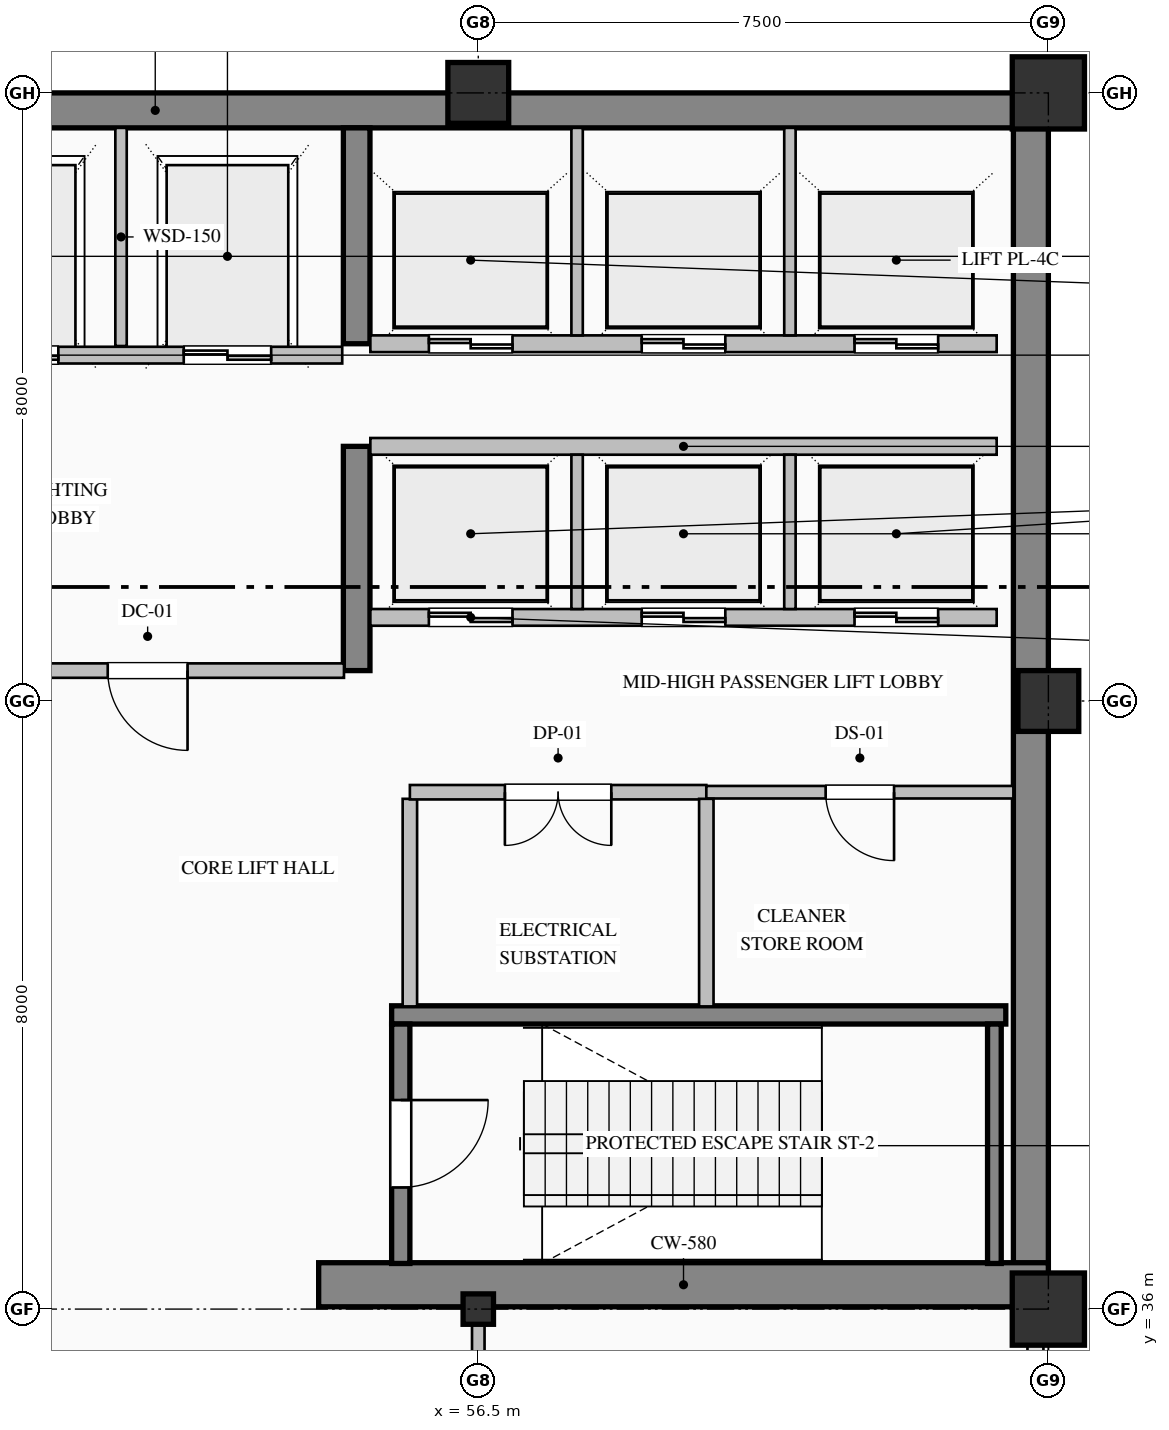
"""IFC4 building model, lengths in metres.
Left out: names, types, materials, properties, quantities, classifications, styles, units other than length and angle.
Written with IfcOpenShell. Run it as: python <this file> out.ifc"""

import sys

from ifc_helpers import new_model, si_unit, direction, frame, frame_2d, origin, origin_2d, place, context, subcontext, project, spatial, rectangle, hollow_rectangle, i_section, extrude, element, fill, save


model = new_model("IFC4")
c1 = context("Model", 3, precision=1e-05, world=origin(), true_north=direction((0.0, 1.0)))
c2 = subcontext(c1, "Body", "Model", "MODEL_VIEW")
j1 = project(units=[si_unit("LENGTHUNIT", "METRE"), si_unit("PLANEANGLEUNIT", "RADIAN")], contexts=[c1])
p1 = place(None, origin())
s1 = spatial("IfcSite", under=j1, at=p1, CompositionType="ELEMENT")
p2 = place(p1, origin())
s2 = spatial("IfcBuilding", under=s1, at=p2, CompositionType="ELEMENT")
p3 = place(p2, frame((0.0, 0.0, 200.4)))
s3 = spatial("IfcBuildingStorey", under=s2, at=p3, CompositionType="ELEMENT", Elevation=200.4)
p4 = place(p3, frame((40.5, 51.77, 0.0), z_axis=(0.0, 0.0, 1.0), x_axis=(1.0, 0.0, 0.0)))
e1 = element("IfcWall", 1, at=p4, inside=s3, PredefinedType="SHEAR", context=c2, shape_type="SweptSolid", body=[
    extrude(rectangle(XDim=23.5, YDim=0.46, at=frame_2d((11.75, 0.0))), origin(), (0.0, 0.0, 1.0), 5.175),
])
p5 = place(p3, frame((63.77, 36.32, 0.0), z_axis=(0.0, 0.0, 1.0), x_axis=(0.0, 1.0, 0.0)))
e2 = element("IfcWall", 2, at=p5, inside=s3, PredefinedType="SHEAR", context=c2, shape_type="SweptSolid", body=[
    extrude(rectangle(XDim=15.22, YDim=0.46, at=frame_2d((7.61, 0.0))), origin(), (0.0, 0.0, 1.0), 5.175),
])
p6 = place(p3, frame((54.4, 36.32, 0.0), z_axis=(0.0, 0.0, 1.0), x_axis=(1.0, 0.0, 0.0)))
e3 = element("IfcWall", 3, at=p6, inside=s3, PredefinedType="SHEAR", context=c2, shape_type="SweptSolid", body=[
    extrude(rectangle(XDim=9.6, YDim=0.58, at=frame_2d((4.8, 0.0))), origin(), (0.0, 0.0, 1.0), 5.4),
])
p7 = place(p3, frame((54.9, 44.4, 0.0), z_axis=(0.0, 0.0, 1.0), x_axis=(0.0, 1.0, 0.0)))
e4 = element("IfcWall", 4, at=p7, inside=s3, PredefinedType="SHEAR", context=c2, shape_type="SweptSolid", body=[
    extrude(rectangle(XDim=2.95, YDim=0.35, at=frame_2d((1.475, 0.0))), origin(), (0.0, 0.0, 1.0), 5.175),
])
p8 = place(p3, frame((54.9, 48.7, 0.0), z_axis=(0.0, 0.0, 1.0), x_axis=(0.0, 1.0, 0.0)))
e5 = element("IfcWall", 5, at=p8, inside=s3, PredefinedType="SHEAR", context=c2, shape_type="SweptSolid", body=[
    extrude(rectangle(XDim=2.84, YDim=0.35, at=frame_2d((1.42, 0.0))), origin(), (0.0, 0.0, 1.0), 5.175),
])
p9 = place(p3, frame((56.5, 36.0, 0.0), z_axis=(0.0, 0.0, 1.0), x_axis=(1.0, 0.0, 0.0)))
e6 = element("IfcColumn", 6, at=p9, inside=s3, PredefinedType="COLUMN", context=c2, shape_type="SweptSolid", body=[
    extrude(i_section(OverallWidth=0.4, OverallDepth=0.4, WebThickness=0.013, FlangeThickness=0.021, FilletRadius=0.022, at=origin_2d()), origin(), (0.0, 0.0, 1.0), 5.4),
])
p10 = place(p3, frame((56.5, 52.0, 0.0), z_axis=(0.0, 0.0, 1.0), x_axis=(1.0, 0.0, 0.0)))
e7 = element("IfcColumn", 7, at=p10, inside=s3, PredefinedType="COLUMN", context=c2, shape_type="SweptSolid", body=[
    extrude(hollow_rectangle(XDim=0.8, YDim=0.8, WallThickness=0.032, at=origin_2d()), origin(), (0.0, 0.0, 1.0), 5.4),
])
p11 = place(p3, frame((64.0, 36.0, 0.0), z_axis=(0.0, 0.0, 1.0), x_axis=(1.0, 0.0, 0.0)))
e8 = element("IfcColumn", 8, at=p11, inside=s3, PredefinedType="COLUMN", context=c2, shape_type="SweptSolid", body=[
    extrude(hollow_rectangle(XDim=0.95, YDim=0.95, WallThickness=0.036, at=origin_2d()), origin(), (0.0, 0.0, 1.0), 5.4),
])
p12 = place(p3, frame((64.0, 44.0, 0.0), z_axis=(0.0, 0.0, 1.0), x_axis=(1.0, 0.0, 0.0)))
e9 = element("IfcColumn", 9, at=p12, inside=s3, PredefinedType="COLUMN", context=c2, shape_type="SweptSolid", body=[
    extrude(hollow_rectangle(XDim=0.8, YDim=0.8, WallThickness=0.032, at=origin_2d()), origin(), (0.0, 0.0, 1.0), 5.4),
])
p13 = place(p3, frame((64.0, 52.0, 0.0), z_axis=(0.0, 0.0, 1.0), x_axis=(1.0, 0.0, 0.0)))
e10 = element("IfcColumn", 10, at=p13, inside=s3, PredefinedType="COLUMN", context=c2, shape_type="SweptSolid", body=[
    extrude(hollow_rectangle(XDim=0.95, YDim=0.95, WallThickness=0.036, at=origin_2d()), origin(), (0.0, 0.0, 1.0), 5.4),
])
p14 = place(p3, frame((55.36, 39.87, 0.0), z_axis=(0.0, 0.0, 1.0), x_axis=(1.0, 0.0, 0.0)))
e11 = element("IfcWall", 11, at=p14, inside=s3, PredefinedType="SOLIDWALL", context=c2, shape_type="SweptSolid", body=[
    extrude(rectangle(XDim=8.08, YDim=0.24, at=frame_2d((4.04, 0.0))), origin(), (0.0, 0.0, 1.0), 5.4),
])
p15 = place(p3, frame((55.48, 39.75, 0.0), z_axis=(0.0, 0.0, 1.0), x_axis=(0.0, -1.0, 0.0)))
e12 = element("IfcWall", 12, at=p15, inside=s3, PredefinedType="SOLIDWALL", context=c2, shape_type="SweptSolid", body=[
    extrude(rectangle(XDim=3.15, YDim=0.24, at=frame_2d((1.575, 0.0))), origin(), (0.0, 0.0, 1.0), 5.4),
])
p16 = place(p15, frame((1.0, 0.0, 0.0)))
e13 = element("IfcOpeningElement", 13, at=p16, cuts=e12, PredefinedType="OPENING", context=c2, shape_type="SweptSolid", body=[
    extrude(rectangle(XDim=1.15, YDim=2.2, at=frame_2d((0.575, 1.1))), frame((0.0, 0.13, 0.0), z_axis=(0.0, -1.0, 0.0), x_axis=(1.0, 0.0, 0.0)), (0.0, 0.0, 1.0), 0.26),
])
p17 = place(p3, frame((63.29, 36.6, 0.0), z_axis=(0.0, 0.0, 1.0), x_axis=(0.0, 1.0, 0.0)))
e14 = element("IfcWall", 14, at=p17, inside=s3, PredefinedType="SOLIDWALL", context=c2, shape_type="SweptSolid", body=[
    extrude(rectangle(XDim=3.15, YDim=0.18, at=frame_2d((1.575, 0.0))), origin(), (0.0, 0.0, 1.0), 5.4),
])
p18 = place(p3, frame((54.71, 48.55, 0.0), z_axis=(0.0, 0.0, 1.0), x_axis=(-1.0, 0.0, 0.0)))
e15 = element("IfcWall", 15, at=p18, inside=s3, PredefinedType="PARTITIONING", context=c2, shape_type="SweptSolid", body=[
    extrude(rectangle(XDim=5.12, YDim=0.22, at=frame_2d((2.56, 0.0))), origin(), (0.0, 0.0, 1.0), 5.175),
])
p19 = place(p18, frame((3.735, 0.0, 0.0)))
e16 = element("IfcOpeningElement", 16, at=p19, cuts=e15, PredefinedType="OPENING", context=c2, shape_type="SweptSolid", body=[
    extrude(rectangle(XDim=1.15, YDim=2.2, at=frame_2d((0.575, 1.1))), frame((0.0, 0.12, 0.0), z_axis=(0.0, -1.0, 0.0), x_axis=(1.0, 0.0, 0.0)), (0.0, 0.0, 1.0), 0.24),
])
p20 = place(p18, frame((0.935, 0.0, 0.0)))
e17 = element("IfcOpeningElement", 17, at=p20, cuts=e15, PredefinedType="OPENING", context=c2, shape_type="SweptSolid", body=[
    extrude(rectangle(XDim=1.15, YDim=2.2, at=frame_2d((0.575, 1.1))), frame((0.0, 0.12, 0.0), z_axis=(0.0, -1.0, 0.0), x_axis=(1.0, 0.0, 0.0)), (0.0, 0.0, 1.0), 0.24),
])
p21 = place(p3, frame((51.8, 48.67, 0.0), z_axis=(0.0, 0.0, 1.0), x_axis=(0.0, 1.0, 0.0)))
e18 = element("IfcWall", 18, at=p21, inside=s3, PredefinedType="PARTITIONING", context=c2, shape_type="SweptSolid", body=[
    extrude(rectangle(XDim=2.87, YDim=0.15, at=frame_2d((1.435, 0.0))), origin(), (0.0, 0.0, 1.0), 5.175),
])
p22 = place(p3, frame((63.32, 45.1, 0.0), z_axis=(0.0, 0.0, 1.0), x_axis=(-1.0, 0.0, 0.0)))
e19 = element("IfcWall", 19, at=p22, inside=s3, PredefinedType="PARTITIONING", context=c2, shape_type="SweptSolid", body=[
    extrude(rectangle(XDim=8.24, YDim=0.22, at=frame_2d((4.12, 0.0))), origin(), (0.0, 0.0, 1.0), 5.175),
])
p23 = place(p22, frame((6.37, 0.0, 0.0)))
e20 = element("IfcOpeningElement", 20, at=p23, cuts=e19, PredefinedType="OPENING", context=c2, shape_type="SweptSolid", body=[
    extrude(rectangle(XDim=1.1, YDim=2.2, at=frame_2d((0.55, 1.1))), frame((0.0, 0.12, 0.0), z_axis=(0.0, -1.0, 0.0), x_axis=(1.0, 0.0, 0.0)), (0.0, 0.0, 1.0), 0.24),
])
p24 = place(p22, frame((3.57, 0.0, 0.0)))
e21 = element("IfcOpeningElement", 21, at=p24, cuts=e19, PredefinedType="OPENING", context=c2, shape_type="SweptSolid", body=[
    extrude(rectangle(XDim=1.1, YDim=2.2, at=frame_2d((0.55, 1.1))), frame((0.0, 0.12, 0.0), z_axis=(0.0, -1.0, 0.0), x_axis=(1.0, 0.0, 0.0)), (0.0, 0.0, 1.0), 0.24),
])
p25 = place(p22, frame((0.77, 0.0, 0.0)))
e22 = element("IfcOpeningElement", 22, at=p25, cuts=e19, PredefinedType="OPENING", context=c2, shape_type="SweptSolid", body=[
    extrude(rectangle(XDim=1.1, YDim=2.2, at=frame_2d((0.55, 1.1))), frame((0.0, 0.12, 0.0), z_axis=(0.0, -1.0, 0.0), x_axis=(1.0, 0.0, 0.0)), (0.0, 0.0, 1.0), 0.24),
])
p26 = place(p3, frame((55.08, 47.35, 0.0), z_axis=(0.0, 0.0, 1.0), x_axis=(1.0, 0.0, 0.0)))
e23 = element("IfcWall", 23, at=p26, inside=s3, PredefinedType="PARTITIONING", context=c2, shape_type="SweptSolid", body=[
    extrude(rectangle(XDim=8.24, YDim=0.22, at=frame_2d((4.12, 0.0))), origin(), (0.0, 0.0, 1.0), 5.175),
])
for number, where, z_axis, x_axis in (
    (24, (57.8, 45.21, 0.0), (0.0, 0.0, 1.0), (0.0, 1.0, 0.0)),
    (25, (60.6, 45.21, 0.0), (0.0, 0.0, 1.0), (0.0, 1.0, 0.0)),
):
    element("IfcWall", number, at=place(p3, frame(where, z_axis=z_axis, x_axis=x_axis)), inside=s3, PredefinedType="PARTITIONING", context=c2, shape_type="SweptSolid", body=[
        extrude(rectangle(XDim=2.03, YDim=0.15, at=frame_2d((1.015, 0.0))), origin(), (0.0, 0.0, 1.0), 5.175),
    ])
p27 = place(p3, frame((63.32, 48.7, 0.0), z_axis=(0.0, 0.0, 1.0), x_axis=(-1.0, 0.0, 0.0)))
e26 = element("IfcWall", 26, at=p27, inside=s3, PredefinedType="PARTITIONING", context=c2, shape_type="SweptSolid", body=[
    extrude(rectangle(XDim=8.24, YDim=0.22, at=frame_2d((4.12, 0.0))), origin(), (0.0, 0.0, 1.0), 5.175),
])
p28 = place(p27, frame((6.37, 0.0, 0.0)))
e27 = element("IfcOpeningElement", 27, at=p28, cuts=e26, PredefinedType="OPENING", context=c2, shape_type="SweptSolid", body=[
    extrude(rectangle(XDim=1.1, YDim=2.2, at=frame_2d((0.55, 1.1))), frame((0.0, 0.12, 0.0), z_axis=(0.0, -1.0, 0.0), x_axis=(1.0, 0.0, 0.0)), (0.0, 0.0, 1.0), 0.24),
])
p29 = place(p27, frame((3.57, 0.0, 0.0)))
e28 = element("IfcOpeningElement", 28, at=p29, cuts=e26, PredefinedType="OPENING", context=c2, shape_type="SweptSolid", body=[
    extrude(rectangle(XDim=1.1, YDim=2.2, at=frame_2d((0.55, 1.1))), frame((0.0, 0.12, 0.0), z_axis=(0.0, -1.0, 0.0), x_axis=(1.0, 0.0, 0.0)), (0.0, 0.0, 1.0), 0.24),
])
p30 = place(p27, frame((0.77, 0.0, 0.0)))
e29 = element("IfcOpeningElement", 29, at=p30, cuts=e26, PredefinedType="OPENING", context=c2, shape_type="SweptSolid", body=[
    extrude(rectangle(XDim=1.1, YDim=2.2, at=frame_2d((0.55, 1.1))), frame((0.0, 0.12, 0.0), z_axis=(0.0, -1.0, 0.0), x_axis=(1.0, 0.0, 0.0)), (0.0, 0.0, 1.0), 0.24),
])
for number, where, z_axis, x_axis in (
    (30, (57.8, 48.81, 0.0), (0.0, 0.0, 1.0), (0.0, 1.0, 0.0)),
    (31, (60.6, 48.81, 0.0), (0.0, 0.0, 1.0), (0.0, 1.0, 0.0)),
):
    element("IfcWall", number, at=place(p3, frame(where, z_axis=z_axis, x_axis=x_axis)), inside=s3, PredefinedType="PARTITIONING", context=c2, shape_type="SweptSolid", body=[
        extrude(rectangle(XDim=2.73, YDim=0.15, at=frame_2d((1.365, 0.0))), origin(), (0.0, 0.0, 1.0), 5.175),
    ])
p31 = place(p3, frame((54.733, 44.4, 0.0), z_axis=(0.0, 0.0, 1.0), x_axis=(-1.0, 0.0, 0.0)))
e32 = element("IfcWall", 32, at=p31, inside=s3, PredefinedType="PARTITIONING", context=c2, shape_type="SweptSolid", body=[
    extrude(rectangle(XDim=5.166, YDim=0.19, at=frame_2d((2.583, 0.0))), origin(), (0.0, 0.0, 1.0), 5.175),
])
p32 = place(p31, frame((2.058, 0.0, 0.0)))
e33 = element("IfcOpeningElement", 33, at=p32, cuts=e32, PredefinedType="OPENING", context=c2, shape_type="SweptSolid", body=[
    extrude(rectangle(XDim=1.05, YDim=2.15, at=frame_2d((0.525, 1.075))), frame((0.0, 0.105, 0.0), z_axis=(0.0, -1.0, 0.0), x_axis=(1.0, 0.0, 0.0)), (0.0, 0.0, 1.0), 0.21),
])
p33 = place(p3, frame((55.6, 42.713, 0.0), z_axis=(0.0, 0.0, 1.0), x_axis=(0.0, -1.0, 0.0)))
e34 = element("IfcWall", 34, at=p33, inside=s3, PredefinedType="PARTITIONING", context=c2, shape_type="SweptSolid", body=[
    extrude(rectangle(XDim=2.731, YDim=0.19, at=frame_2d((1.365, 0.0))), origin(), (0.0, 0.0, 1.0), 5.175),
])
p34 = place(p3, frame((59.5, 42.8, 0.0), z_axis=(0.0, 0.0, 1.0), x_axis=(-1.0, 0.0, 0.0)))
e35 = element("IfcWall", 35, at=p34, inside=s3, PredefinedType="PARTITIONING", context=c2, shape_type="SweptSolid", body=[
    extrude(rectangle(XDim=3.9, YDim=0.19, at=frame_2d((1.95, 0.0))), origin(), (0.0, 0.0, 1.0), 5.175),
])
p35 = place(p34, frame((1.25, 0.0, 0.0)))
e36 = element("IfcOpeningElement", 36, at=p35, cuts=e35, PredefinedType="OPENING", context=c2, shape_type="SweptSolid", body=[
    extrude(rectangle(XDim=1.4, YDim=2.25, at=frame_2d((0.7, 1.125))), frame((0.0, 0.105, 0.0), z_axis=(0.0, -1.0, 0.0), x_axis=(1.0, 0.0, 0.0)), (0.0, 0.0, 1.0), 0.21),
])
p36 = place(p3, frame((63.54, 42.8, 0.0), z_axis=(0.0, 0.0, 1.0), x_axis=(-1.0, 0.0, 0.0)))
e37 = element("IfcWall", 37, at=p36, inside=s3, PredefinedType="PARTITIONING", context=c2, shape_type="SweptSolid", body=[
    extrude(rectangle(XDim=4.04, YDim=0.165, at=frame_2d((2.02, 0.0))), origin(), (0.0, 0.0, 1.0), 5.175),
])
p37 = place(p36, frame((1.57, 0.0, 0.0)))
e38 = element("IfcOpeningElement", 38, at=p37, cuts=e37, PredefinedType="OPENING", context=c2, shape_type="SweptSolid", body=[
    extrude(rectangle(XDim=0.9, YDim=2.15, at=frame_2d((0.45, 1.075))), frame((0.0, 0.093, 0.0), z_axis=(0.0, -1.0, 0.0), x_axis=(1.0, 0.0, 0.0)), (0.0, 0.0, 1.0), 0.185),
])
p38 = place(p3, frame((59.5, 42.713, 0.0), z_axis=(0.0, 0.0, 1.0), x_axis=(0.0, -1.0, 0.0)))
e39 = element("IfcWall", 39, at=p38, inside=s3, PredefinedType="PARTITIONING", context=c2, shape_type="SweptSolid", body=[
    extrude(rectangle(XDim=2.731, YDim=0.19, at=frame_2d((1.365, 0.0))), origin(), (0.0, 0.0, 1.0), 5.175),
])
p39 = place(p3, frame((56.5, 36.0, 0.0), z_axis=(0.0, 0.0, 1.0), x_axis=(0.0, -1.0, 0.0)))
e40 = element("IfcWall", 40, at=p39, inside=s3, PredefinedType="PARTITIONING", context=c2, shape_type="SweptSolid", body=[
    extrude(rectangle(XDim=5.525, YDim=0.165, at=frame_2d((2.763, 0.0))), origin(), (0.0, 0.0, 1.0), 4.579),
])
p40 = place(p16, origin())
e41 = element("IfcDoor", 41, at=p40, inside=s3, OperationType="SINGLE_SWING_LEFT", PredefinedType="DOOR", context=c2, shape_type="SweptSolid", body=[
    extrude(rectangle(XDim=1.15, YDim=2.2, at=frame_2d((0.575, 1.1))), frame((0.0, 0.025, 0.0), z_axis=(0.0, -1.0, 0.0), x_axis=(1.0, 0.0, 0.0)), (0.0, 0.0, 1.0), 0.05),
])
fill(e13, e41)
p41 = place(p19, origin())
e42 = element("IfcDoor", 42, at=p41, inside=s3, OperationType="DOUBLE_DOOR_SLIDING", PredefinedType="DOOR", context=c2, shape_type="SweptSolid", body=[
    extrude(rectangle(XDim=1.15, YDim=2.2, at=frame_2d((0.575, 1.1))), frame((0.0, 0.025, 0.0), z_axis=(0.0, -1.0, 0.0), x_axis=(1.0, 0.0, 0.0)), (0.0, 0.0, 1.0), 0.05),
])
fill(e16, e42)
p42 = place(p20, origin())
e43 = element("IfcDoor", 43, at=p42, inside=s3, OperationType="DOUBLE_DOOR_SLIDING", PredefinedType="DOOR", context=c2, shape_type="SweptSolid", body=[
    extrude(rectangle(XDim=1.15, YDim=2.2, at=frame_2d((0.575, 1.1))), frame((0.0, 0.025, 0.0), z_axis=(0.0, -1.0, 0.0), x_axis=(1.0, 0.0, 0.0)), (0.0, 0.0, 1.0), 0.05),
])
fill(e17, e43)
p43 = place(p23, origin())
e44 = element("IfcDoor", 44, at=p43, inside=s3, OperationType="DOUBLE_DOOR_SLIDING", PredefinedType="DOOR", context=c2, shape_type="SweptSolid", body=[
    extrude(rectangle(XDim=1.1, YDim=2.2, at=frame_2d((0.55, 1.1))), frame((0.0, 0.025, 0.0), z_axis=(0.0, -1.0, 0.0), x_axis=(1.0, 0.0, 0.0)), (0.0, 0.0, 1.0), 0.05),
])
fill(e20, e44)
p44 = place(p24, origin())
e45 = element("IfcDoor", 45, at=p44, inside=s3, OperationType="DOUBLE_DOOR_SLIDING", PredefinedType="DOOR", context=c2, shape_type="SweptSolid", body=[
    extrude(rectangle(XDim=1.1, YDim=2.2, at=frame_2d((0.55, 1.1))), frame((0.0, 0.025, 0.0), z_axis=(0.0, -1.0, 0.0), x_axis=(1.0, 0.0, 0.0)), (0.0, 0.0, 1.0), 0.05),
])
fill(e21, e45)
p45 = place(p25, origin())
e46 = element("IfcDoor", 46, at=p45, inside=s3, OperationType="DOUBLE_DOOR_SLIDING", PredefinedType="DOOR", context=c2, shape_type="SweptSolid", body=[
    extrude(rectangle(XDim=1.1, YDim=2.2, at=frame_2d((0.55, 1.1))), frame((0.0, 0.025, 0.0), z_axis=(0.0, -1.0, 0.0), x_axis=(1.0, 0.0, 0.0)), (0.0, 0.0, 1.0), 0.05),
])
fill(e22, e46)
p46 = place(p28, origin())
e47 = element("IfcDoor", 47, at=p46, inside=s3, OperationType="DOUBLE_DOOR_SLIDING", PredefinedType="DOOR", context=c2, shape_type="SweptSolid", body=[
    extrude(rectangle(XDim=1.1, YDim=2.2, at=frame_2d((0.55, 1.1))), frame((0.0, 0.025, 0.0), z_axis=(0.0, -1.0, 0.0), x_axis=(1.0, 0.0, 0.0)), (0.0, 0.0, 1.0), 0.05),
])
fill(e27, e47)
p47 = place(p29, origin())
e48 = element("IfcDoor", 48, at=p47, inside=s3, OperationType="DOUBLE_DOOR_SLIDING", PredefinedType="DOOR", context=c2, shape_type="SweptSolid", body=[
    extrude(rectangle(XDim=1.1, YDim=2.2, at=frame_2d((0.55, 1.1))), frame((0.0, 0.025, 0.0), z_axis=(0.0, -1.0, 0.0), x_axis=(1.0, 0.0, 0.0)), (0.0, 0.0, 1.0), 0.05),
])
fill(e28, e48)
p48 = place(p30, origin())
e49 = element("IfcDoor", 49, at=p48, inside=s3, OperationType="DOUBLE_DOOR_SLIDING", PredefinedType="DOOR", context=c2, shape_type="SweptSolid", body=[
    extrude(rectangle(XDim=1.1, YDim=2.2, at=frame_2d((0.55, 1.1))), frame((0.0, 0.025, 0.0), z_axis=(0.0, -1.0, 0.0), x_axis=(1.0, 0.0, 0.0)), (0.0, 0.0, 1.0), 0.05),
])
fill(e29, e49)
p49 = place(p32, origin())
e50 = element("IfcDoor", 50, at=p49, inside=s3, OperationType="SINGLE_SWING_LEFT", PredefinedType="DOOR", context=c2, shape_type="SweptSolid", body=[
    extrude(rectangle(XDim=1.05, YDim=2.15, at=frame_2d((0.525, 1.075))), frame((0.0, 0.025, 0.0), z_axis=(0.0, -1.0, 0.0), x_axis=(1.0, 0.0, 0.0)), (0.0, 0.0, 1.0), 0.05),
])
fill(e33, e50)
p50 = place(p35, origin())
e51 = element("IfcDoor", 51, at=p50, inside=s3, OperationType="DOUBLE_DOOR_SINGLE_SWING", PredefinedType="DOOR", context=c2, shape_type="SweptSolid", body=[
    extrude(rectangle(XDim=1.4, YDim=2.25, at=frame_2d((0.7, 1.125))), frame((0.0, 0.025, 0.0), z_axis=(0.0, -1.0, 0.0), x_axis=(1.0, 0.0, 0.0)), (0.0, 0.0, 1.0), 0.05),
])
fill(e36, e51)
p51 = place(p37, origin())
e52 = element("IfcDoor", 52, at=p51, inside=s3, OperationType="SINGLE_SWING_LEFT", PredefinedType="DOOR", context=c2, shape_type="SweptSolid", body=[
    extrude(rectangle(XDim=0.9, YDim=2.15, at=frame_2d((0.45, 1.075))), frame((0.0, 0.025, 0.0), z_axis=(0.0, -1.0, 0.0), x_axis=(1.0, 0.0, 0.0)), (0.0, 0.0, 1.0), 0.05),
])
fill(e38, e52)
save(model, sys.argv[1])
